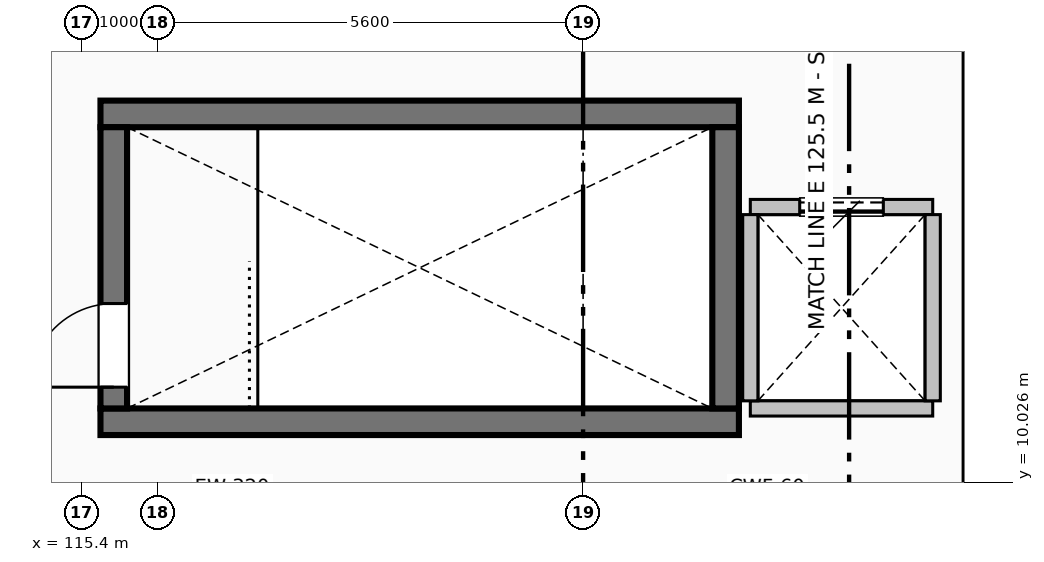
"""IFC4 building model, lengths in metres.
Left out: names, types, materials, properties, quantities, classifications, styles, units other than length and angle.
Written with IfcOpenShell. Run it as: python <this file> out.ifc"""

import sys

from ifc_helpers import new_model, si_unit, direction, frame, frame_2d, origin, place, context, subcontext, project, spatial, rectangle, extrude, element, fill, save


model = new_model("IFC4")
c1 = context("Model", 3, precision=1e-05, world=origin(), true_north=direction((0.0, 1.0)))
c2 = subcontext(c1, "Body", "Model", "MODEL_VIEW")
j1 = project(units=[si_unit("LENGTHUNIT", "METRE"), si_unit("PLANEANGLEUNIT", "RADIAN")], contexts=[c1])
p1 = place(None, origin())
s1 = spatial("IfcSite", under=j1, at=p1, CompositionType="ELEMENT")
p2 = place(p1, origin())
s2 = spatial("IfcBuilding", under=s1, at=p2, CompositionType="ELEMENT")
p3 = place(p2, frame((0.0, 0.0, 15.0)))
s3 = spatial("IfcBuildingStorey", under=s2, at=p3, CompositionType="ELEMENT", Elevation=15.0)
for number, where, z_axis, x_axis in (
    (1, (115.65, 10.825, 0.0), (0.0, 0.0, 1.0), (1.0, 0.0, 0.0)),
    (2, (124.05, 14.875, 0.0), (0.0, 0.0, 1.0), (-1.0, 0.0, 0.0)),
):
    element("IfcWall", number, at=place(p3, frame(where, z_axis=z_axis, x_axis=x_axis)), inside=s3, PredefinedType="SHEAR", context=c2, shape_type="SweptSolid", body=[
        extrude(rectangle(XDim=8.4, YDim=0.35, at=frame_2d((4.2, 0.0))), origin(), (0.0, 0.0, 1.0), 4.28),
    ])
p4 = place(p3, frame((115.825, 11.0, 0.0), z_axis=(0.0, 0.0, 1.0), x_axis=(0.0, 1.0, 0.0)))
e3 = element("IfcWall", 3, at=p4, inside=s3, PredefinedType="SHEAR", context=c2, shape_type="SweptSolid", body=[
    extrude(rectangle(XDim=3.7, YDim=0.35, at=frame_2d((1.85, 0.0))), origin(), (0.0, 0.0, 1.0), 4.28),
])
p5 = place(p4, frame((0.28, 0.0, 0.0)))
e4 = element("IfcOpeningElement", 4, at=p5, cuts=e3, PredefinedType="OPENING", context=c2, shape_type="SweptSolid", body=[
    extrude(rectangle(XDim=1.1, YDim=2.08, at=frame_2d((0.55, 1.04))), frame((0.0, 0.185, 0.0), z_axis=(0.0, -1.0, 0.0), x_axis=(1.0, 0.0, 0.0)), (0.0, 0.0, 1.0), 0.37),
])
p6 = place(p3, frame((123.875, 14.7, 0.0), z_axis=(0.0, 0.0, 1.0), x_axis=(0.0, -1.0, 0.0)))
e5 = element("IfcWall", 5, at=p6, inside=s3, PredefinedType="SHEAR", context=c2, shape_type="SweptSolid", body=[
    extrude(rectangle(XDim=3.7, YDim=0.35, at=frame_2d((1.85, 0.0))), origin(), (0.0, 0.0, 1.0), 4.28),
])
p7 = place(p3, frame((124.2, 11.0, 0.0), z_axis=(0.0, 0.0, 1.0), x_axis=(1.0, 0.0, 0.0)))
e6 = element("IfcWall", 6, at=p7, inside=s3, PredefinedType="PARTITIONING", context=c2, shape_type="SweptSolid", body=[
    extrude(rectangle(XDim=2.4, YDim=0.2, at=frame_2d((1.2, 0.0))), origin(), (0.0, 0.0, 1.0), 4.192),
])
p8 = place(p3, frame((126.6, 13.65, 0.0), z_axis=(0.0, 0.0, 1.0), x_axis=(-1.0, 0.0, 0.0)))
e7 = element("IfcWall", 7, at=p8, inside=s3, PredefinedType="PARTITIONING", context=c2, shape_type="SweptSolid", body=[
    extrude(rectangle(XDim=2.4, YDim=0.2, at=frame_2d((1.2, 0.0))), origin(), (0.0, 0.0, 1.0), 4.192),
])
p9 = place(p8, frame((0.65, 0.0, 0.0)))
e8 = element("IfcOpeningElement", 8, at=p9, cuts=e7, PredefinedType="OPENING", context=c2, shape_type="SweptSolid", body=[
    extrude(rectangle(XDim=1.1, YDim=2.15, at=frame_2d((0.55, 1.075))), frame((0.0, 0.11, 0.0), z_axis=(0.0, -1.0, 0.0), x_axis=(1.0, 0.0, 0.0)), (0.0, 0.0, 1.0), 0.22),
])
for number, where, z_axis, x_axis in (
    (9, (124.2, 11.1, 0.0), (0.0, 0.0, 1.0), (0.0, 1.0, 0.0)),
    (10, (126.6, 13.55, 0.0), (0.0, 0.0, 1.0), (0.0, -1.0, 0.0)),
):
    element("IfcWall", number, at=place(p3, frame(where, z_axis=z_axis, x_axis=x_axis)), inside=s3, PredefinedType="PARTITIONING", context=c2, shape_type="SweptSolid", body=[
        extrude(rectangle(XDim=2.45, YDim=0.2, at=frame_2d((1.225, 0.0))), origin(), (0.0, 0.0, 1.0), 4.192),
    ])
p10 = place(p5, origin())
e11 = element("IfcDoor", 11, at=p10, inside=s3, OperationType="SINGLE_SWING_LEFT", PredefinedType="DOOR", context=c2, shape_type="SweptSolid", body=[
    extrude(rectangle(XDim=1.1, YDim=2.08, at=frame_2d((0.55, 1.04))), frame((0.0, 0.025, 0.0), z_axis=(0.0, -1.0, 0.0), x_axis=(1.0, 0.0, 0.0)), (0.0, 0.0, 1.0), 0.05),
])
fill(e4, e11)
p11 = place(p9, origin())
e12 = element("IfcDoor", 12, at=p11, inside=s3, OperationType="SLIDING_TO_LEFT", PredefinedType="DOOR", context=c2, shape_type="SweptSolid", body=[
    extrude(rectangle(XDim=1.1, YDim=2.15, at=frame_2d((0.55, 1.075))), frame((0.0, 0.025, 0.0), z_axis=(0.0, -1.0, 0.0), x_axis=(1.0, 0.0, 0.0)), (0.0, 0.0, 1.0), 0.05),
])
fill(e8, e12)
save(model, sys.argv[1])
